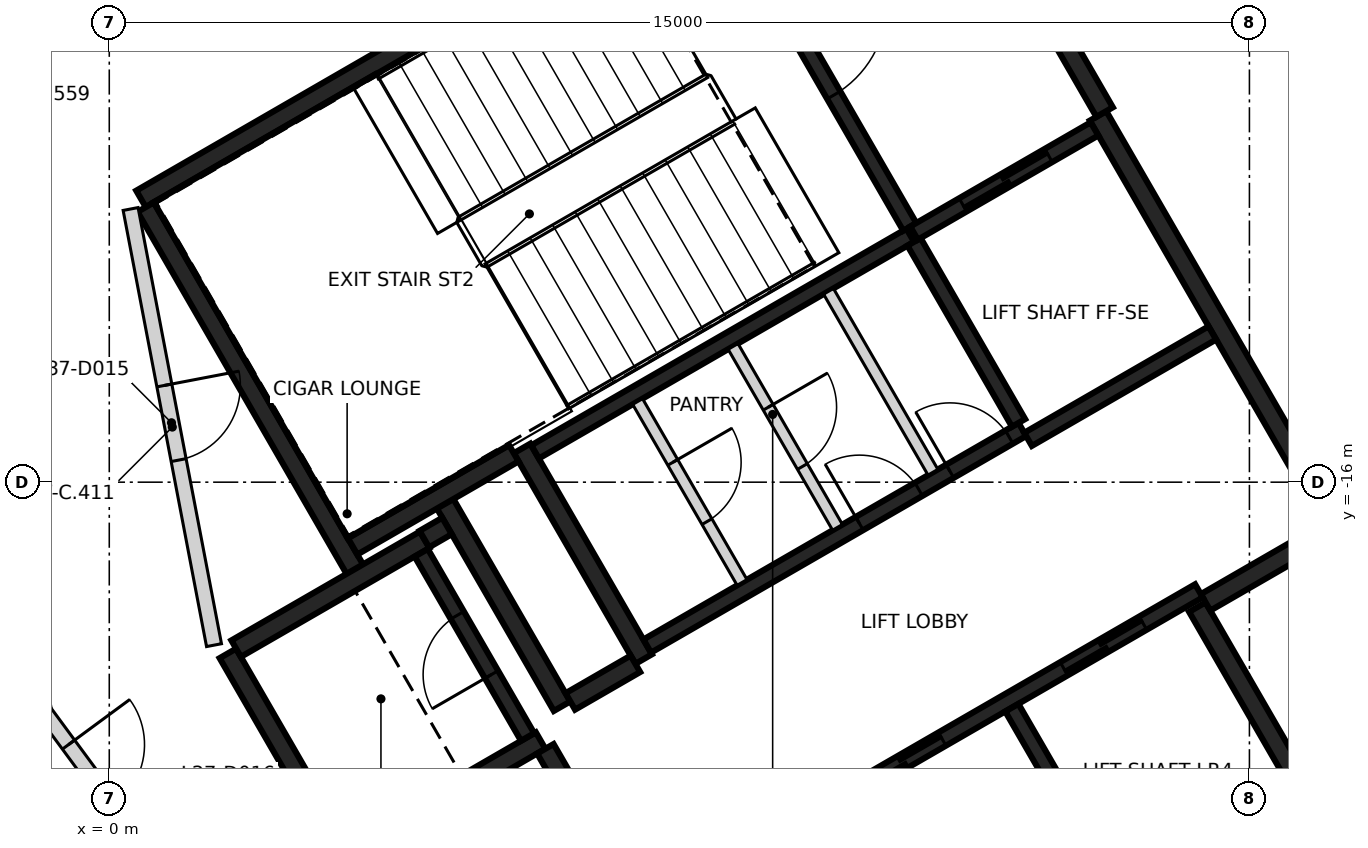
"""IFC4 building model, lengths in metres.
Left out: names, types, materials, properties, quantities, classifications, styles, units other than length and angle.
Written with IfcOpenShell. Run it as: python <this file> out.ifc"""

import sys

from ifc_helpers import new_model, si_unit, direction, frame, frame_2d, origin, place, context, subcontext, project, spatial, rectangle, extrude, element, fill, save


model = new_model("IFC4")
c1 = context("Model", 3, precision=1e-05, world=origin(), true_north=direction((0.0, 1.0)))
c2 = subcontext(c1, "Body", "Model", "MODEL_VIEW")
j1 = project(units=[si_unit("LENGTHUNIT", "METRE"), si_unit("PLANEANGLEUNIT", "RADIAN")], contexts=[c1])
p1 = place(None, origin())
s1 = spatial("IfcSite", under=j1, at=p1, CompositionType="ELEMENT")
p2 = place(p1, origin())
s2 = spatial("IfcBuilding", under=s1, at=p2, CompositionType="ELEMENT")
p3 = place(p2, frame((0.0, 0.0, 150.4)))
s3 = spatial("IfcBuildingStorey", under=s2, at=p3, CompositionType="ELEMENT", Elevation=150.4)
p4 = place(p3, frame((0.417, -12.273, 0.0), z_axis=(0.0, 0.0, 1.0), x_axis=(0.866021906294, 0.500006057782, 0.0)))
e1 = element("IfcWall", 1, at=p4, inside=s3, PredefinedType="SHEAR", context=c2, shape_type="SweptSolid", body=[
    extrude(rectangle(XDim=11.55, YDim=0.25, at=frame_2d((5.775, 0.0))), origin(), (0.0, 0.0, 1.0), 3.2),
])
p5 = place(p4, frame((10.025, 0.0, 0.0)))
e2 = element("IfcOpeningElement", 2, at=p5, cuts=e1, PredefinedType="OPENING", context=c2, shape_type="SweptSolid", body=[
    extrude(rectangle(XDim=1.2, YDim=2.1, at=frame_2d((0.6, 1.05))), frame((0.0, 0.135, 0.0), z_axis=(0.0, -1.0, 0.0), x_axis=(1.0, 0.0, 0.0)), (0.0, 0.0, 1.0), 0.27),
])
p6 = place(p4, frame((8.725, 0.0, 0.0)))
e3 = element("IfcOpeningElement", 3, at=p6, cuts=e1, PredefinedType="OPENING", context=c2, shape_type="SweptSolid", body=[
    extrude(rectangle(XDim=1.2, YDim=2.1, at=frame_2d((0.6, 1.05))), frame((0.0, 0.135, 0.0), z_axis=(0.0, -1.0, 0.0), x_axis=(1.0, 0.0, 0.0)), (0.0, 0.0, 1.0), 0.27),
])
p7 = place(p3, frame((13.008, -11.181, 0.0), z_axis=(0.0, 0.0, 1.0), x_axis=(0.500004234368, -0.866022959057, 0.0)))
e4 = element("IfcWall", 4, at=p7, inside=s3, PredefinedType="SHEAR", context=c2, shape_type="SweptSolid", body=[
    extrude(rectangle(XDim=6.25, YDim=0.25, at=frame_2d((3.125, 0.0))), origin(), (0.0, 0.0, 1.0), 3.2),
])
p8 = place(p3, frame((3.235, -17.153, 0.0), z_axis=(0.0, 0.0, 1.0), x_axis=(-0.500008851346, 0.866020293397, 0.0)))
e5 = element("IfcWall", 5, at=p8, inside=s3, PredefinedType="SHEAR", context=c2, shape_type="SweptSolid", body=[
    extrude(rectangle(XDim=5.51, YDim=0.25, at=frame_2d((2.755, 0.0))), origin(), (0.0, 0.0, 1.0), 3.2),
])
p9 = place(p3, frame((10.483, -6.606, 0.0), z_axis=(0.0, 0.0, 1.0), x_axis=(0.49999885962, -0.866026062182, 0.0)))
e6 = element("IfcWall", 6, at=p9, inside=s3, PredefinedType="SHEAR", context=c2, shape_type="SweptSolid", body=[
    extrude(rectangle(XDim=5.225, YDim=0.25, at=frame_2d((2.612, 0.0))), origin(), (0.0, 0.0, 1.0), 3.2),
])
p10 = place(p3, frame((7.031, -18.327, 0.0), z_axis=(0.0, 0.0, 1.0), x_axis=(-0.499971222258, 0.866042017984, 0.0)))
e7 = element("IfcWall", 7, at=p10, inside=s3, PredefinedType="SHEAR", context=c2, shape_type="SweptSolid", body=[
    extrude(rectangle(XDim=3.2, YDim=0.25, at=frame_2d((1.6, 0.0))), origin(), (0.0, 0.0, 1.0), 3.2),
])
p11 = place(p3, frame((14.315, -17.644, 0.0), z_axis=(0.0, 0.0, 1.0), x_axis=(0.500023226632, -0.866011993467, 0.0)))
e8 = element("IfcWall", 8, at=p11, inside=s3, PredefinedType="SHEAR", context=c2, shape_type="SweptSolid", body=[
    extrude(rectangle(XDim=2.974, YDim=0.25, at=frame_2d((1.487, 0.0))), origin(), (0.0, 0.0, 1.0), 3.2),
])
p12 = place(p3, frame((3.085, -20.894, 0.0), z_axis=(0.0, 0.0, 1.0), x_axis=(-0.499978833458, 0.866037623948, 0.0)))
e9 = element("IfcWall", 9, at=p12, inside=s3, PredefinedType="SHEAR", context=c2, shape_type="SweptSolid", body=[
    extrude(rectangle(XDim=3.05, YDim=0.25, at=frame_2d((1.525, 0.0))), origin(), (0.0, 0.0, 1.0), 3.2),
])
p13 = place(p3, frame((1.669, -18.19, 0.0), z_axis=(0.0, 0.0, 1.0), x_axis=(0.866042235819, 0.499970844928, 0.0)))
e10 = element("IfcWall", 10, at=p13, inside=s3, PredefinedType="SHEAR", context=c2, shape_type="SweptSolid", body=[
    extrude(rectangle(XDim=2.865, YDim=0.25, at=frame_2d((1.432, 0.0))), origin(), (0.0, 0.0, 1.0), 3.2),
])
p14 = place(p3, frame((5.675, -19.399, 0.0), z_axis=(0.0, 0.0, 1.0), x_axis=(-0.866026637627, -0.499997862916, 0.0)))
e11 = element("IfcWall", 11, at=p14, inside=s3, PredefinedType="SHEAR", context=c2, shape_type="SweptSolid", body=[
    extrude(rectangle(XDim=2.865, YDim=0.25, at=frame_2d((1.432, 0.0))), origin(), (0.0, 0.0, 1.0), 3.2),
])
p15 = place(p3, frame((4.414, -16.276, 0.0), z_axis=(0.0, 0.0, 1.0), x_axis=(0.500003324108, -0.866023484601, 0.0)))
e12 = element("IfcWall", 12, at=p15, inside=s3, PredefinedType="SHEAR", context=c2, shape_type="SweptSolid", body=[
    extrude(rectangle(XDim=3.085, YDim=0.25, at=frame_2d((1.542, 0.0))), origin(), (0.0, 0.0, 1.0), 3.2),
])
p16 = place(p3, frame((5.322, -15.619, 0.0), z_axis=(0.0, 0.0, 1.0), x_axis=(-0.866026229868, -0.499998569178, 0.0)))
e13 = element("IfcWall", 13, at=p16, inside=s3, PredefinedType="SHEAR", context=c2, shape_type="SweptSolid", body=[
    extrude(rectangle(XDim=2.449, YDim=0.25, at=frame_2d((1.225, 0.0))), origin(), (0.0, 0.0, 1.0), 3.2),
])
p17 = place(p3, frame((16.025, -16.656, 0.0), z_axis=(0.0, 0.0, 1.0), x_axis=(-0.866016279763, -0.500015802937, 0.0)))
e14 = element("IfcWall", 14, at=p17, inside=s3, PredefinedType="SHEAR", context=c2, shape_type="SweptSolid", body=[
    extrude(rectangle(XDim=1.849, YDim=0.25, at=frame_2d((0.925, 0.0))), origin(), (0.0, 0.0, 1.0), 3.2),
])
p18 = place(p3, frame((6.065, -18.885, 0.0), z_axis=(0.0, 0.0, 1.0), x_axis=(0.866017078145, 0.500014420154, 0.0)))
e15 = element("IfcWall", 15, at=p18, inside=s3, PredefinedType="SHEAR", context=c2, shape_type="SweptSolid", body=[
    extrude(rectangle(XDim=0.989, YDim=0.25, at=frame_2d((0.495, 0.0))), origin(), (0.0, 0.0, 1.0), 3.2),
])
p19 = place(p3, frame((6.08, -20.1, 0.0), z_axis=(0.0, 0.0, 1.0), x_axis=(-0.500051773299, 0.865995510393, 0.0)))
e16 = element("IfcWall", 16, at=p19, inside=s3, PredefinedType="SHEAR", context=c2, shape_type="SweptSolid", body=[
    extrude(rectangle(XDim=0.685, YDim=0.25, at=frame_2d((0.342, 0.0))), origin(), (0.0, 0.0, 1.0), 3.2),
])
p20 = place(p3, frame((4.145, -16.749, 0.0), z_axis=(0.0, 0.0, 1.0), x_axis=(0.866185586049, 0.49972245349, 0.0)))
e17 = element("IfcWall", 17, at=p20, inside=s3, PredefinedType="SHEAR", context=c2, shape_type="SweptSolid", body=[
    extrude(rectangle(XDim=0.344, YDim=0.25, at=frame_2d((0.172, 0.0))), origin(), (0.0, 0.0, 1.0), 3.2),
])
p21 = place(p3, frame((9.052, -20.48, 0.0), z_axis=(0.0, 0.0, 1.0), x_axis=(0.866030299012, 0.499991521122, 0.0)))
e18 = element("IfcWall", 18, at=p21, inside=s3, PredefinedType="SHEAR", context=c2, shape_type="SweptSolid", body=[
    extrude(rectangle(XDim=6.1, YDim=0.2, at=frame_2d((3.05, 0.0))), origin(), (0.0, 0.0, 1.0), 3.2),
])
p22 = place(p21, frame((1.0, 0.0, 0.0)))
e19 = element("IfcOpeningElement", 19, at=p22, cuts=e18, PredefinedType="OPENING", context=c2, shape_type="SweptSolid", body=[
    extrude(rectangle(XDim=1.2, YDim=2.1, at=frame_2d((0.6, 1.05))), frame((0.0, 0.11, 0.0), z_axis=(0.0, -1.0, 0.0), x_axis=(1.0, 0.0, 0.0)), (0.0, 0.0, 1.0), 0.22),
])
p23 = place(p21, frame((4.05, 0.0, 0.0)))
e20 = element("IfcOpeningElement", 20, at=p23, cuts=e18, PredefinedType="OPENING", context=c2, shape_type="SweptSolid", body=[
    extrude(rectangle(XDim=1.2, YDim=2.1, at=frame_2d((0.6, 1.05))), frame((0.0, 0.11, 0.0), z_axis=(0.0, -1.0, 0.0), x_axis=(1.0, 0.0, 0.0)), (0.0, 0.0, 1.0), 0.22),
])
p24 = place(p3, frame((10.538, -12.752, 0.0), z_axis=(0.0, 0.0, 1.0), x_axis=(-0.866038630372, -0.499977090179, 0.0)))
e21 = element("IfcWall", 21, at=p24, inside=s3, PredefinedType="SHEAR", context=c2, shape_type="SweptSolid", body=[
    extrude(rectangle(XDim=5.699, YDim=0.2, at=frame_2d((2.85, 0.0))), origin(), (0.0, 0.0, 1.0), 3.2),
])
p25 = place(p3, frame((7.077, -18.156, 0.0), z_axis=(0.0, 0.0, 1.0), x_axis=(0.866038630372, 0.499977090179, 0.0)))
e22 = element("IfcWall", 22, at=p25, inside=s3, PredefinedType="SHEAR", context=c2, shape_type="SweptSolid", body=[
    extrude(rectangle(XDim=5.699, YDim=0.2, at=frame_2d((2.85, 0.0))), origin(), (0.0, 0.0, 1.0), 3.2),
])
p26 = place(p25, frame((3.224, 0.0, 0.0)))
e23 = element("IfcOpeningElement", 23, at=p26, cuts=e22, PredefinedType="OPENING", context=c2, shape_type="SweptSolid", body=[
    extrude(rectangle(XDim=0.9, YDim=2.1, at=frame_2d((0.45, 1.05))), frame((0.0, 0.11, 0.0), z_axis=(0.0, -1.0, 0.0), x_axis=(1.0, 0.0, 0.0)), (0.0, 0.0, 1.0), 0.22),
])
p27 = place(p25, frame((4.599, 0.0, 0.0)))
e24 = element("IfcOpeningElement", 24, at=p27, cuts=e22, PredefinedType="OPENING", context=c2, shape_type="SweptSolid", body=[
    extrude(rectangle(XDim=0.9, YDim=2.1, at=frame_2d((0.45, 1.05))), frame((0.0, 0.11, 0.0), z_axis=(0.0, -1.0, 0.0), x_axis=(1.0, 0.0, 0.0)), (0.0, 0.0, 1.0), 0.22),
])
p28 = place(p3, frame((7.906, -8.094, 0.0), z_axis=(0.0, 0.0, 1.0), x_axis=(0.500024287448, -0.866011380966, 0.0)))
e25 = element("IfcWall", 25, at=p28, inside=s3, PredefinedType="SHEAR", context=c2, shape_type="SweptSolid", body=[
    extrude(rectangle(XDim=5.251, YDim=0.2, at=frame_2d((2.625, 0.0))), origin(), (0.0, 0.0, 1.0), 3.2),
])
p29 = place(p28, frame((1.849, 0.0, 0.0)))
e26 = element("IfcOpeningElement", 26, at=p29, cuts=e25, PredefinedType="OPENING", context=c2, shape_type="SweptSolid", body=[
    extrude(rectangle(XDim=1.4, YDim=2.1, at=frame_2d((0.7, 1.05))), frame((0.0, 0.11, 0.0), z_axis=(0.0, -1.0, 0.0), x_axis=(1.0, 0.0, 0.0)), (0.0, 0.0, 1.0), 0.22),
])
p30 = place(p3, frame((11.875, -18.967, 0.0), z_axis=(0.0, 0.0, 1.0), x_axis=(0.49998131003, -0.866036194175, 0.0)))
e27 = element("IfcWall", 27, at=p30, inside=s3, PredefinedType="SHEAR", context=c2, shape_type="SweptSolid", body=[
    extrude(rectangle(XDim=3.048, YDim=0.2, at=frame_2d((1.524, 0.0))), origin(), (0.0, 0.0, 1.0), 3.2),
])
p31 = place(p3, frame((5.503, -19.352, 0.0), z_axis=(0.0, 0.0, 1.0), x_axis=(-0.499986818241, 0.866033014143, 0.0)))
e28 = element("IfcWall", 28, at=p31, inside=s3, PredefinedType="SHEAR", context=c2, shape_type="SweptSolid", body=[
    extrude(rectangle(XDim=2.798, YDim=0.2, at=frame_2d((1.399, 0.0))), origin(), (0.0, 0.0, 1.0), 3.2),
])
p32 = place(p31, frame((0.949, 0.0, 0.0)))
e29 = element("IfcOpeningElement", 29, at=p32, cuts=e28, PredefinedType="OPENING", context=c2, shape_type="SweptSolid", body=[
    extrude(rectangle(XDim=0.9, YDim=2.1, at=frame_2d((0.45, 1.05))), frame((0.0, 0.11, 0.0), z_axis=(0.0, -1.0, 0.0), x_axis=(1.0, 0.0, 0.0)), (0.0, 0.0, 1.0), 0.22),
])
p33 = place(p3, frame((11.963, -15.22, 0.0), z_axis=(0.0, 0.0, 1.0), x_axis=(-0.500034990121, 0.866005201286, 0.0)))
e30 = element("IfcWall", 30, at=p33, inside=s3, PredefinedType="SHEAR", context=c2, shape_type="SweptSolid", body=[
    extrude(rectangle(XDim=2.75, YDim=0.2, at=frame_2d((1.375, 0.0))), origin(), (0.0, 0.0, 1.0), 3.2),
])
p34 = place(p3, frame((10.587, -12.723, 0.0), z_axis=(0.0, 0.0, 1.0), x_axis=(0.866037306777, 0.499979382845, 0.0)))
e31 = element("IfcWall", 31, at=p34, inside=s3, PredefinedType="SHEAR", context=c2, shape_type="SweptSolid", body=[
    extrude(rectangle(XDim=2.742, YDim=0.2, at=frame_2d((1.371, 0.0))), origin(), (0.0, 0.0, 1.0), 3.2),
])
p35 = place(p34, frame((0.743, 0.0, 0.0)))
e32 = element("IfcOpeningElement", 32, at=p35, cuts=e31, PredefinedType="OPENING", context=c2, shape_type="SweptSolid", body=[
    extrude(rectangle(XDim=1.3, YDim=2.1, at=frame_2d((0.65, 1.05))), frame((0.0, 0.11, 0.0), z_axis=(0.0, -1.0, 0.0), x_axis=(1.0, 0.0, 0.0)), (0.0, 0.0, 1.0), 0.22),
])
p36 = place(p3, frame((14.512, -14.037, 0.0), z_axis=(0.0, 0.0, 1.0), x_axis=(-0.866044696403, -0.499966582715, 0.0)))
e33 = element("IfcWall", 33, at=p36, inside=s3, PredefinedType="SHEAR", context=c2, shape_type="SweptSolid", body=[
    extrude(rectangle(XDim=2.799, YDim=0.2, at=frame_2d((1.399, 0.0))), origin(), (0.0, 0.0, 1.0), 3.2),
])
p37 = place(p3, frame((8.207, -14.214, 0.0), z_axis=(0.0, 0.0, 1.0), x_axis=(0.50002746344, -0.86600954718, 0.0)))
e34 = element("IfcWall", 34, at=p37, inside=s3, PredefinedType="PARTITIONING", context=c2, shape_type="SweptSolid", body=[
    extrude(rectangle(XDim=2.748, YDim=0.15, at=frame_2d((1.374, 0.0))), origin(), (0.0, 0.0, 1.0), 3.2),
])
p38 = place(p37, frame((0.924, 0.0, 0.0)))
e35 = element("IfcOpeningElement", 35, at=p38, cuts=e34, PredefinedType="OPENING", context=c2, shape_type="SweptSolid", body=[
    extrude(rectangle(XDim=0.9, YDim=2.1, at=frame_2d((0.45, 1.05))), frame((0.0, 0.085, 0.0), z_axis=(0.0, -1.0, 0.0), x_axis=(1.0, 0.0, 0.0)), (0.0, 0.0, 1.0), 0.17),
])
p39 = place(p3, frame((9.462, -13.489, 0.0), z_axis=(0.0, 0.0, 1.0), x_axis=(0.499988999718, -0.866031754707, 0.0)))
e36 = element("IfcWall", 36, at=p39, inside=s3, PredefinedType="PARTITIONING", context=c2, shape_type="SweptSolid", body=[
    extrude(rectangle(XDim=2.749, YDim=0.15, at=frame_2d((1.374, 0.0))), origin(), (0.0, 0.0, 1.0), 3.2),
])
p40 = place(p3, frame((6.951, -14.939, 0.0), z_axis=(0.0, 0.0, 1.0), x_axis=(0.499988999718, -0.866031754707, 0.0)))
e37 = element("IfcWall", 37, at=p40, inside=s3, PredefinedType="PARTITIONING", context=c2, shape_type="SweptSolid", body=[
    extrude(rectangle(XDim=2.749, YDim=0.15, at=frame_2d((1.374, 0.0))), origin(), (0.0, 0.0, 1.0), 3.2),
])
p41 = place(p40, frame((0.924, 0.0, 0.0)))
e38 = element("IfcOpeningElement", 38, at=p41, cuts=e37, PredefinedType="OPENING", context=c2, shape_type="SweptSolid", body=[
    extrude(rectangle(XDim=0.9, YDim=2.1, at=frame_2d((0.45, 1.05))), frame((0.0, 0.085, 0.0), z_axis=(0.0, -1.0, 0.0), x_axis=(1.0, 0.0, 0.0)), (0.0, 0.0, 1.0), 0.17),
])
p42 = place(p3, frame((-2.162, -12.041, 0.0), z_axis=(0.0, 0.0, 1.0), x_axis=(0.448937335771, 0.893563242614, 0.0)))
e39 = element("IfcWall", 39, at=p42, inside=s3, PredefinedType="PARTITIONING", context=c2, shape_type="SweptSolid", body=[
    extrude(rectangle(XDim=3.115, YDim=0.2, at=frame_2d((1.557, 0.0))), origin(), (0.0, 0.0, 1.0), 3.2),
])
p43 = place(p3, frame((-0.858, -19.016, 0.0), z_axis=(0.0, 0.0, 1.0), x_axis=(0.593123867414, -0.805111220829, 0.0)))
e40 = element("IfcWall", 40, at=p43, inside=s3, PredefinedType="PARTITIONING", context=c2, shape_type="SweptSolid", body=[
    extrude(rectangle(XDim=2.77, YDim=0.2, at=frame_2d((1.385, 0.0))), origin(), (0.0, 0.0, 1.0), 3.2),
])
p44 = place(p43, frame((0.542, 0.0, 0.0)))
e41 = element("IfcOpeningElement", 41, at=p44, cuts=e40, PredefinedType="OPENING", context=c2, shape_type="SweptSolid", body=[
    extrude(rectangle(XDim=1.0, YDim=2.1, at=frame_2d((0.5, 1.05))), frame((0.0, 0.11, 0.0), z_axis=(0.0, -1.0, 0.0), x_axis=(1.0, 0.0, 0.0)), (0.0, 0.0, 1.0), 0.22),
])
p45 = place(p3, frame((0.281, -12.406, 0.0), z_axis=(0.0, 0.0, 1.0), x_axis=(0.187814940093, -0.982204433037, 0.0)))
e42 = element("IfcWall", 42, at=p45, inside=s3, PredefinedType="PARTITIONING", context=c2, shape_type="SweptSolid", body=[
    extrude(rectangle(XDim=5.842, YDim=0.2, at=frame_2d((2.921, 0.0))), origin(), (0.0, 0.0, 1.0), 3.2),
])
p46 = place(p45, frame((2.363, 0.0, 0.0)))
e43 = element("IfcOpeningElement", 43, at=p46, cuts=e42, PredefinedType="OPENING", context=c2, shape_type="SweptSolid", body=[
    extrude(rectangle(XDim=1.0, YDim=2.1, at=frame_2d((0.5, 1.05))), frame((0.0, 0.11, 0.0), z_axis=(0.0, -1.0, 0.0), x_axis=(1.0, 0.0, 0.0)), (0.0, 0.0, 1.0), 0.22),
])
p47 = place(p35, origin())
e44 = element("IfcDoor", 44, at=p47, inside=s3, OperationType="SLIDING_TO_RIGHT", PredefinedType="DOOR", context=c2, shape_type="SweptSolid", body=[
    extrude(rectangle(XDim=1.3, YDim=2.1, at=frame_2d((0.65, 1.05))), frame((0.0, 0.025, 0.0), z_axis=(0.0, -1.0, 0.0), x_axis=(1.0, 0.0, 0.0)), (0.0, 0.0, 1.0), 0.05),
])
fill(e32, e44)
p48 = place(p22, origin())
e45 = element("IfcDoor", 45, at=p48, inside=s3, OperationType="DOUBLE_DOOR_SLIDING", PredefinedType="DOOR", context=c2, shape_type="SweptSolid", body=[
    extrude(rectangle(XDim=1.2, YDim=2.1, at=frame_2d((0.6, 1.05))), frame((0.0, 0.025, 0.0), z_axis=(0.0, -1.0, 0.0), x_axis=(1.0, 0.0, 0.0)), (0.0, 0.0, 1.0), 0.05),
])
fill(e19, e45)
p49 = place(p23, origin())
e46 = element("IfcDoor", 46, at=p49, inside=s3, OperationType="DOUBLE_DOOR_SLIDING", PredefinedType="DOOR", context=c2, shape_type="SweptSolid", body=[
    extrude(rectangle(XDim=1.2, YDim=2.1, at=frame_2d((0.6, 1.05))), frame((0.0, 0.025, 0.0), z_axis=(0.0, -1.0, 0.0), x_axis=(1.0, 0.0, 0.0)), (0.0, 0.0, 1.0), 0.05),
])
fill(e20, e46)
p50 = place(p29, origin())
e47 = element("IfcDoor", 47, at=p50, inside=s3, OperationType="SINGLE_SWING_RIGHT", PredefinedType="DOOR", context=c2, shape_type="SweptSolid", body=[
    extrude(rectangle(XDim=1.4, YDim=2.1, at=frame_2d((0.7, 1.05))), frame((0.0, 0.025, 0.0), z_axis=(0.0, -1.0, 0.0), x_axis=(1.0, 0.0, 0.0)), (0.0, 0.0, 1.0), 0.05),
])
fill(e26, e47)
p51 = place(p26, origin())
e48 = element("IfcDoor", 48, at=p51, inside=s3, OperationType="SINGLE_SWING_LEFT", PredefinedType="DOOR", context=c2, shape_type="SweptSolid", body=[
    extrude(rectangle(XDim=0.9, YDim=2.1, at=frame_2d((0.45, 1.05))), frame((0.0, 0.025, 0.0), z_axis=(0.0, -1.0, 0.0), x_axis=(1.0, 0.0, 0.0)), (0.0, 0.0, 1.0), 0.05),
])
fill(e23, e48)
p52 = place(p27, origin())
e49 = element("IfcDoor", 49, at=p52, inside=s3, OperationType="SINGLE_SWING_RIGHT", PredefinedType="DOOR", context=c2, shape_type="SweptSolid", body=[
    extrude(rectangle(XDim=0.9, YDim=2.1, at=frame_2d((0.45, 1.05))), frame((0.0, 0.025, 0.0), z_axis=(0.0, -1.0, 0.0), x_axis=(1.0, 0.0, 0.0)), (0.0, 0.0, 1.0), 0.05),
])
fill(e24, e49)
p53 = place(p32, origin())
e50 = element("IfcDoor", 50, at=p53, inside=s3, OperationType="SINGLE_SWING_LEFT", PredefinedType="DOOR", context=c2, shape_type="SweptSolid", body=[
    extrude(rectangle(XDim=0.9, YDim=2.1, at=frame_2d((0.45, 1.05))), frame((0.0, 0.025, 0.0), z_axis=(0.0, -1.0, 0.0), x_axis=(1.0, 0.0, 0.0)), (0.0, 0.0, 1.0), 0.05),
])
fill(e29, e50)
p54 = place(p38, origin())
e51 = element("IfcDoor", 51, at=p54, inside=s3, OperationType="SINGLE_SWING_RIGHT", PredefinedType="DOOR", context=c2, shape_type="SweptSolid", body=[
    extrude(rectangle(XDim=0.9, YDim=2.1, at=frame_2d((0.45, 1.05))), frame((0.0, 0.025, 0.0), z_axis=(0.0, -1.0, 0.0), x_axis=(1.0, 0.0, 0.0)), (0.0, 0.0, 1.0), 0.05),
])
fill(e35, e51)
p55 = place(p41, origin())
e52 = element("IfcDoor", 52, at=p55, inside=s3, OperationType="SINGLE_SWING_LEFT", PredefinedType="DOOR", context=c2, shape_type="SweptSolid", body=[
    extrude(rectangle(XDim=0.9, YDim=2.1, at=frame_2d((0.45, 1.05))), frame((0.0, 0.025, 0.0), z_axis=(0.0, -1.0, 0.0), x_axis=(1.0, 0.0, 0.0)), (0.0, 0.0, 1.0), 0.05),
])
fill(e38, e52)
p56 = place(p46, origin())
e53 = element("IfcDoor", 53, at=p56, inside=s3, OperationType="SINGLE_SWING_LEFT", PredefinedType="DOOR", context=c2, shape_type="SweptSolid", body=[
    extrude(rectangle(XDim=1.0, YDim=2.1, at=frame_2d((0.5, 1.05))), frame((0.0, 0.025, 0.0), z_axis=(0.0, -1.0, 0.0), x_axis=(1.0, 0.0, 0.0)), (0.0, 0.0, 1.0), 0.05),
])
fill(e43, e53)
p57 = place(p44, frame((1.0, 0.0, 0.0), z_axis=(0.0, 0.0, 1.0), x_axis=(-1.0, 0.0, 0.0)))
e54 = element("IfcDoor", 54, at=p57, inside=s3, OperationType="SINGLE_SWING_LEFT", PredefinedType="DOOR", context=c2, shape_type="SweptSolid", body=[
    extrude(rectangle(XDim=1.0, YDim=2.1, at=frame_2d((0.5, 1.05))), frame((0.0, 0.025, 0.0), z_axis=(0.0, -1.0, 0.0), x_axis=(1.0, 0.0, 0.0)), (0.0, 0.0, 1.0), 0.05),
])
fill(e41, e54)
save(model, sys.argv[1])
